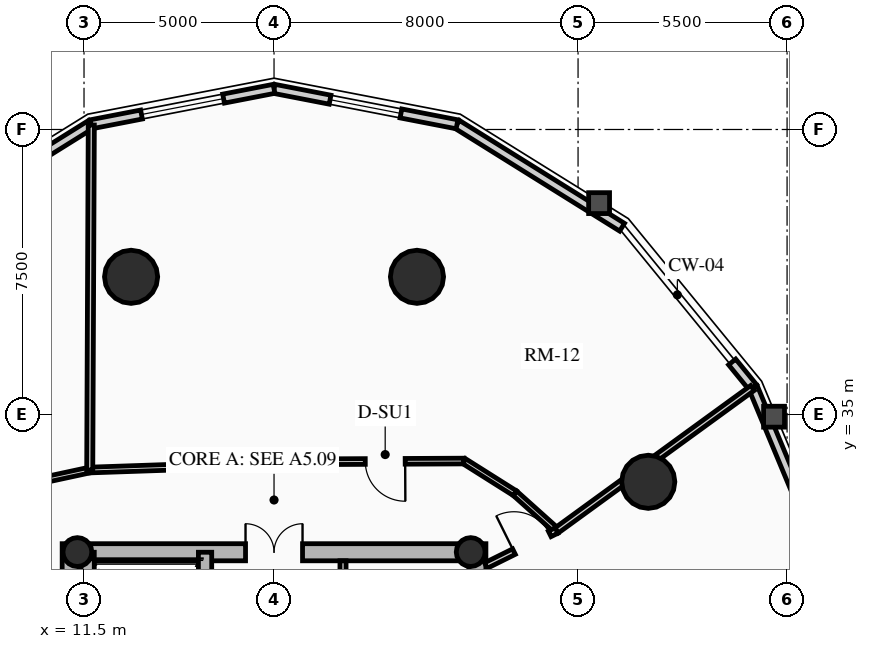
"""IFC4 building model, lengths in metres.
Left out: names, types, materials, properties, quantities, classifications, styles, units other than length and angle.
Written with IfcOpenShell. Run it as: python <this file> out.ifc"""

import sys

from ifc_helpers import new_model, si_unit, direction, frame, frame_2d, origin, origin_2d, place, context, subcontext, project, spatial, rectangle, circle, hollow_circle, extrude, source, transform, mapped, element, fill, save


model = new_model("IFC4")
c1 = context("Model", 3, precision=1e-05, world=origin(), true_north=direction((0.0, 1.0)))
c2 = subcontext(c1, "Body", "Model", "MODEL_VIEW")
j1 = project(units=[si_unit("LENGTHUNIT", "METRE"), si_unit("PLANEANGLEUNIT", "RADIAN")], contexts=[c1])
p1 = place(None, origin())
s1 = spatial("IfcSite", under=j1, at=p1, CompositionType="ELEMENT")
p2 = place(p1, origin())
s2 = spatial("IfcBuilding", under=s1, at=p2, CompositionType="ELEMENT")
p3 = place(p2, frame((0.0, 0.0, 136.6)))
s3 = spatial("IfcBuildingStorey", under=s2, at=p3, CompositionType="ELEMENT", Elevation=136.6)
for number, where, z_axis, x_axis in (
    (1, (11.15, 17.4, 0.0), (0.0, 0.0, 1.0), (0.0, 1.0, 0.0)),
    (2, (21.85, 17.4, 0.0), (0.0, 0.0, 1.0), (0.0, 1.0, 0.0)),
):
    element("IfcWall", number, at=place(p3, frame(where, z_axis=z_axis, x_axis=x_axis)), inside=s3, PredefinedType="SHEAR", context=c2, shape_type="SweptSolid", body=[
        extrude(rectangle(XDim=14.2, YDim=0.45, at=frame_2d((7.1, 0.0))), origin(), (0.0, 0.0, 1.0), 3.72),
    ])
p4 = place(p3, frame((11.15, 31.375, 0.0), z_axis=(0.0, 0.0, 1.0), x_axis=(1.0, 0.0, 0.0)))
e3 = element("IfcWall", 3, at=p4, inside=s3, PredefinedType="SHEAR", context=c2, shape_type="SweptSolid", body=[
    extrude(rectangle(XDim=10.7, YDim=0.45, at=frame_2d((5.35, 0.0))), origin(), (0.0, 0.0, 1.0), 3.72),
])
m1 = source(origin(), c2, "Body", "SweptSolid", [
    extrude(rectangle(XDim=1.5, YDim=2.02, at=frame_2d((0.75, 1.01))), frame((0.0, 0.235, 0.0), z_axis=(0.0, -1.0, 0.0), x_axis=(1.0, 0.0, 0.0)), (0.0, 0.0, 1.0), 0.47),
])
p5 = place(p4, frame((4.6, 0.0, 0.0)))
e4 = element("IfcOpeningElement", 4, at=p5, cuts=e3, PredefinedType="OPENING", context=c2, shape_type="MappedRepresentation", body=[
    mapped(m1, transform((0.0, 0.0, 0.0), x_axis=(1.0, 0.0, 0.0), y_axis=(0.0, 1.0, 0.0), z_axis=(0.0, 0.0, 1.0), scale=1.0)),
])
p6 = place(p3, frame((14.685, 17.625, 0.0), z_axis=(0.0, 0.0, 1.0), x_axis=(0.0, 1.0, 0.0)))
e5 = element("IfcWall", 5, at=p6, inside=s3, PredefinedType="SHEAR", context=c2, shape_type="SweptSolid", body=[
    extrude(rectangle(XDim=13.75, YDim=0.35, at=frame_2d((6.875, 0.0))), origin(), (0.0, 0.0, 1.0), 3.72),
])
m2 = source(origin(), c2, "Body", "SweptSolid", [
    extrude(rectangle(XDim=1.1, YDim=2.015, at=frame_2d((0.55, 1.007))), frame((0.0, 0.185, 0.0), z_axis=(0.0, -1.0, 0.0), x_axis=(1.0, 0.0, 0.0)), (0.0, 0.0, 1.0), 0.37),
])
p7 = place(p6, frame((4.875, 0.0, 0.0)))
e6 = element("IfcOpeningElement", 6, at=p7, cuts=e5, PredefinedType="OPENING", context=c2, shape_type="MappedRepresentation", body=[
    mapped(m2, transform((0.0, 0.0, 0.0), x_axis=(1.0, 0.0, 0.0), y_axis=(0.0, 1.0, 0.0), z_axis=(0.0, 0.0, 1.0), scale=1.0)),
])
p8 = place(p6, frame((0.65, 0.0, 0.0)))
e7 = element("IfcOpeningElement", 7, at=p8, cuts=e5, PredefinedType="OPENING", context=c2, shape_type="MappedRepresentation", body=[
    mapped(m2, transform((0.0, 0.0, 0.0), x_axis=(1.0, 0.0, 0.0), y_axis=(0.0, 1.0, 0.0), z_axis=(0.0, 0.0, 1.0), scale=1.0)),
])
p9 = place(p6, frame((2.65, 0.0, 0.0)))
e8 = element("IfcOpeningElement", 8, at=p9, cuts=e5, PredefinedType="OPENING", context=c2, shape_type="MappedRepresentation", body=[
    mapped(m2, transform((0.0, 0.0, 0.0), x_axis=(1.0, 0.0, 0.0), y_axis=(0.0, 1.0, 0.0), z_axis=(0.0, 0.0, 1.0), scale=1.0)),
])
m3 = source(origin(), c2, "Body", "SweptSolid", [
    extrude(rectangle(XDim=1.15, YDim=2.02, at=frame_2d((0.575, 1.01))), frame((0.0, 0.185, 0.0), z_axis=(0.0, -1.0, 0.0), x_axis=(1.0, 0.0, 0.0)), (0.0, 0.0, 1.0), 0.37),
])
p10 = place(p6, frame((7.295, 0.0, 0.0)))
e9 = element("IfcOpeningElement", 9, at=p10, cuts=e5, PredefinedType="OPENING", context=c2, shape_type="MappedRepresentation", body=[
    mapped(m3, transform((0.0, 0.0, 0.0), x_axis=(1.0, 0.0, 0.0), y_axis=(0.0, 1.0, 0.0), z_axis=(0.0, 0.0, 1.0), scale=1.0)),
])
p11 = place(p3, frame((11.595, 24.655, 0.0), z_axis=(0.0, 0.0, 1.0), x_axis=(0.0, 1.0, 0.0)))
e10 = element("IfcWall", 10, at=p11, inside=s3, PredefinedType="SHEAR", context=c2, shape_type="SweptSolid", body=[
    extrude(rectangle(XDim=6.72, YDim=0.35, at=frame_2d((3.36, 0.0))), origin(), (0.0, 0.0, 1.0), 3.72),
])
for number, where, z_axis, x_axis in (
    (11, (11.325, 31.38, 0.0), (0.0, 0.0, 1.0), (1.0, 0.0, 0.0)),
    (12, (21.675, 31.38, 0.0), (0.0, 0.0, 1.0), (1.0, 0.0, 0.0)),
):
    element("IfcColumn", number, at=place(p3, frame(where, z_axis=z_axis, x_axis=x_axis)), inside=s3, PredefinedType="COLUMN", context=c2, shape_type="SweptSolid", body=[
        extrude(hollow_circle(Radius=0.38, WallThickness=0.032, at=origin_2d()), origin(), (0.0, 0.0, 1.0), 3.72),
    ])
for number, where, z_axis, x_axis in (
    (13, (26.347, 33.229, 0.0), (0.0, 0.0, 1.0), (1.0, 0.0, 0.0)),
    (14, (20.261, 38.623, 0.0), (0.0, 0.0, 1.0), (1.0, 0.0, 0.0)),
    (15, (12.739, 38.623, 0.0), (0.0, 0.0, 1.0), (1.0, 0.0, 0.0)),
):
    element("IfcColumn", number, at=place(p3, frame(where, z_axis=z_axis, x_axis=x_axis)), inside=s3, PredefinedType="USERDEFINED", context=c2, shape_type="SweptSolid", body=[
        extrude(circle(Radius=0.7, at=origin_2d()), origin(), (0.0, 0.0, 1.0), 3.72),
    ])
p12 = place(p3, frame((29.105, 35.709, 0.0), z_axis=(0.0, 0.0, 1.0), x_axis=(0.384344417632, -0.923189779317, 0.0)))
e16 = element("IfcWall", 16, at=p12, inside=s3, PredefinedType="SOLIDWALL", context=c2, shape_type="SweptSolid", body=[
    extrude(rectangle(XDim=5.758, YDim=0.24, at=frame_2d((2.879, 0.0))), origin(), (0.0, 0.0, 1.0), 2.949),
])
p13 = place(p3, frame((28.555, 36.383, 0.0), z_axis=(0.0, 0.0, 1.0), x_axis=(0.632702874536, -0.774394649099, 0.0)))
e17 = element("IfcWall", 17, at=p13, inside=s3, PredefinedType="SOLIDWALL", context=c2, shape_type="SweptSolid", body=[
    extrude(rectangle(XDim=0.87, YDim=0.24, at=frame_2d((0.435, 0.0))), origin(), (0.0, 0.0, 1.0), 2.949),
])
p14 = place(p3, frame((21.315, 42.637, 0.0), z_axis=(0.0, 0.0, 1.0), x_axis=(0.848520380187, -0.529162701263, 0.0)))
e18 = element("IfcWall", 18, at=p14, inside=s3, PredefinedType="SOLIDWALL", context=c2, shape_type="SweptSolid", body=[
    extrude(rectangle(XDim=5.119, YDim=0.24, at=frame_2d((2.56, 0.0))), origin(), (0.0, 0.0, 1.0), 2.949),
])
p15 = place(p3, frame((16.5, 43.57, 0.0), z_axis=(0.0, 0.0, 1.0), x_axis=(0.981723785992, -0.190311344954, 0.0)))
e19 = element("IfcWall", 19, at=p15, inside=s3, PredefinedType="SOLIDWALL", context=c2, shape_type="SweptSolid", body=[
    extrude(rectangle(XDim=4.904, YDim=0.24, at=frame_2d((2.452, 0.0))), origin(), (0.0, 0.0, 1.0), 2.949),
])
m4 = source(origin(), c2, "Body", "SweptSolid", [
    extrude(rectangle(XDim=1.9, YDim=1.35, at=frame_2d((0.95, 0.675))), frame((0.0, 0.13, 0.0), z_axis=(0.0, -1.0, 0.0), x_axis=(1.0, 0.0, 0.0)), (0.0, 0.0, 1.0), 0.26),
])
p16 = place(p15, frame((1.502, 0.0, 0.65)))
e20 = element("IfcOpeningElement", 20, at=p16, cuts=e19, PredefinedType="OPENING", context=c2, shape_type="MappedRepresentation", body=[
    mapped(m4, transform((0.0, 0.0, 0.0), x_axis=(1.0, 0.0, 0.0), y_axis=(0.0, 1.0, 0.0), z_axis=(0.0, 0.0, 1.0), scale=1.0)),
])
p17 = place(p3, frame((11.685, 42.637, 0.0), z_axis=(0.0, 0.0, 1.0), x_axis=(0.981723785992, 0.190311344954, 0.0)))
e21 = element("IfcWall", 21, at=p17, inside=s3, PredefinedType="SOLIDWALL", context=c2, shape_type="SweptSolid", body=[
    extrude(rectangle(XDim=4.904, YDim=0.24, at=frame_2d((2.452, 0.0))), origin(), (0.0, 0.0, 1.0), 2.949),
])
m5 = source(origin(), c2, "Body", "SweptSolid", [
    extrude(rectangle(XDim=2.2, YDim=1.35, at=frame_2d((1.1, 0.675))), frame((0.0, 0.13, 0.0), z_axis=(0.0, -1.0, 0.0), x_axis=(1.0, 0.0, 0.0)), (0.0, 0.0, 1.0), 0.26),
])
p18 = place(p17, frame((1.352, 0.0, 0.65)))
e22 = element("IfcOpeningElement", 22, at=p18, cuts=e21, PredefinedType="OPENING", context=c2, shape_type="MappedRepresentation", body=[
    mapped(m5, transform((0.0, 0.0, 0.0), x_axis=(1.0, 0.0, 0.0), y_axis=(0.0, 1.0, 0.0), z_axis=(0.0, 0.0, 1.0), scale=1.0)),
])
p19 = place(p3, frame((7.342, 39.928, 0.0), z_axis=(0.0, 0.0, 1.0), x_axis=(0.848520380187, 0.529162701263, 0.0)))
e23 = element("IfcWall", 23, at=p19, inside=s3, PredefinedType="SOLIDWALL", context=c2, shape_type="SweptSolid", body=[
    extrude(rectangle(XDim=5.119, YDim=0.24, at=frame_2d((2.56, 0.0))), origin(), (0.0, 0.0, 1.0), 2.949),
])
p20 = place(p3, frame((18.315, 27.25, 0.0), z_axis=(0.0, 0.0, 1.0), x_axis=(0.0, 1.0, 0.0)))
e24 = element("IfcWall", 24, at=p20, inside=s3, PredefinedType="PARTITIONING", context=c2, shape_type="SweptSolid", body=[
    extrude(rectangle(XDim=3.9, YDim=0.16, at=frame_2d((1.95, 0.0))), origin(), (0.0, 0.0, 1.0), 3.425),
])
m6 = source(origin(), c2, "Body", "SweptSolid", [
    extrude(rectangle(XDim=0.9, YDim=2.005, at=frame_2d((0.45, 1.002))), frame((0.0, 0.09, 0.0), z_axis=(0.0, -1.0, 0.0), x_axis=(1.0, 0.0, 0.0)), (0.0, 0.0, 1.0), 0.18),
])
p21 = place(p20, frame((2.2, 0.0, 0.0)))
e25 = element("IfcOpeningElement", 25, at=p21, cuts=e24, PredefinedType="OPENING", context=c2, shape_type="MappedRepresentation", body=[
    mapped(m6, transform((0.0, 0.0, 0.0), x_axis=(1.0, 0.0, 0.0), y_axis=(0.0, 1.0, 0.0), z_axis=(0.0, 0.0, 1.0), scale=1.0)),
])
p22 = place(p3, frame((23.933, 31.946, 0.0), z_axis=(0.0, 0.0, 1.0), x_axis=(-0.744529651383, 0.667589393423, 0.0)))
e26 = element("IfcWall", 26, at=p22, inside=s3, PredefinedType="PARTITIONING", context=c2, shape_type="SweptSolid", body=[
    extrude(rectangle(XDim=1.472, YDim=0.15, at=frame_2d((0.736, 0.0))), origin(), (0.0, 0.0, 1.0), 2.995),
])
p23 = place(p3, frame((22.837, 32.929, 0.0), z_axis=(0.0, 0.0, 1.0), x_axis=(-0.84581079329, 0.533482991252, 0.0)))
e27 = element("IfcWall", 27, at=p23, inside=s3, PredefinedType="PARTITIONING", context=c2, shape_type="SweptSolid", body=[
    extrude(rectangle(XDim=1.585, YDim=0.15, at=frame_2d((0.792, 0.0))), origin(), (0.0, 0.0, 1.0), 2.995),
])
p24 = place(p3, frame((21.496, 33.775, 0.0), z_axis=(0.0, 0.0, 1.0), x_axis=(-0.999989544737, -0.004572790979, 0.0)))
e28 = element("IfcWall", 28, at=p24, inside=s3, PredefinedType="PARTITIONING", context=c2, shape_type="SweptSolid", body=[
    extrude(rectangle(XDim=3.364, YDim=0.15, at=frame_2d((1.682, 0.0))), origin(), (0.0, 0.0, 1.0), 2.995),
])
m7 = source(origin(), c2, "Body", "SweptSolid", [
    extrude(rectangle(XDim=1.05, YDim=2.015, at=frame_2d((0.525, 1.007))), frame((0.0, 0.085, 0.0), z_axis=(0.0, -1.0, 0.0), x_axis=(1.0, 0.0, 0.0)), (0.0, 0.0, 1.0), 0.17),
])
p25 = place(p24, frame((1.546, 0.0, 0.0)))
e29 = element("IfcOpeningElement", 29, at=p25, cuts=e28, PredefinedType="OPENING", context=c2, shape_type="MappedRepresentation", body=[
    mapped(m7, transform((0.0, 0.0, 0.0), x_axis=(1.0, 0.0, 0.0), y_axis=(0.0, 1.0, 0.0), z_axis=(0.0, 0.0, 1.0), scale=1.0)),
])
p26 = place(p3, frame((18.133, 33.76, 0.0), z_axis=(0.0, 0.0, 1.0), x_axis=(-0.999419643988, -0.034064280574, 0.0)))
e30 = element("IfcWall", 30, at=p26, inside=s3, PredefinedType="PARTITIONING", context=c2, shape_type="SweptSolid", body=[
    extrude(rectangle(XDim=6.486, YDim=0.15, at=frame_2d((3.243, 0.0))), origin(), (0.0, 0.0, 1.0), 2.995),
])
p27 = place(p3, frame((11.65, 33.539, 0.0), z_axis=(0.0, 0.0, 1.0), x_axis=(-0.977535921581, -0.210768882949, 0.0)))
e31 = element("IfcWall", 31, at=p27, inside=s3, PredefinedType="PARTITIONING", context=c2, shape_type="SweptSolid", body=[
    extrude(rectangle(XDim=1.923, YDim=0.15, at=frame_2d((0.961, 0.0))), origin(), (0.0, 0.0, 1.0), 2.995),
])
p28 = place(p3, frame((23.933, 31.946, 0.0), z_axis=(0.0, 0.0, 1.0), x_axis=(0.808636722237, 0.588308296261, 0.0)))
e32 = element("IfcWall", 32, at=p28, inside=s3, PredefinedType="PARTITIONING", context=c2, shape_type="SweptSolid", body=[
    extrude(rectangle(XDim=6.376, YDim=0.16, at=frame_2d((3.188, 0.0))), origin(), (0.0, 0.0, 1.0), 2.949),
])
p29 = place(p3, frame((11.65, 33.539, 0.0), z_axis=(0.0, 0.0, 1.0), x_axis=(0.00451754022, 0.999989795863, 0.0)))
e33 = element("IfcWall", 33, at=p29, inside=s3, PredefinedType="PARTITIONING", context=c2, shape_type="SweptSolid", body=[
    extrude(rectangle(XDim=9.079, YDim=0.16, at=frame_2d((4.54, 0.0))), origin(), (0.0, 0.0, 1.0), 2.949),
])
p30 = place(p3, frame((22.075, 31.025, 0.0), z_axis=(0.0, 0.0, 1.0), x_axis=(0.8959286695, 0.444197950432, 0.0)))
e34 = element("IfcWall", 34, at=p30, inside=s3, PredefinedType="PARTITIONING", context=c2, shape_type="SweptSolid", body=[
    extrude(rectangle(XDim=2.074, YDim=0.16, at=frame_2d((1.037, 0.0))), origin(), (0.0, 0.0, 1.0), 2.995),
])
m8 = source(origin(), c2, "Body", "SweptSolid", [
    extrude(rectangle(XDim=1.05, YDim=2.015, at=frame_2d((0.525, 1.007))), frame((0.0, 0.09, 0.0), z_axis=(0.0, -1.0, 0.0), x_axis=(1.0, 0.0, 0.0)), (0.0, 0.0, 1.0), 0.18),
])
p31 = place(p30, frame((0.824, 0.0, 0.0)))
e35 = element("IfcOpeningElement", 35, at=p31, cuts=e34, PredefinedType="OPENING", context=c2, shape_type="MappedRepresentation", body=[
    mapped(m8, transform((0.0, 0.0, 0.0), x_axis=(1.0, 0.0, 0.0), y_axis=(0.0, 1.0, 0.0), z_axis=(0.0, 0.0, 1.0), scale=1.0)),
])
m9 = source(origin(), c2, "Body", "SweptSolid", [
    extrude(rectangle(XDim=1.9, YDim=1.35, at=frame_2d((0.95, 0.675))), frame((0.0, 0.03, 0.0), z_axis=(0.0, -1.0, 0.0), x_axis=(1.0, 0.0, 0.0)), (0.0, 0.0, 1.0), 0.06),
])
p32 = place(p16, origin())
e36 = element("IfcWindow", 36, at=p32, inside=s3, PartitioningType="DOUBLE_PANEL_VERTICAL", PredefinedType="WINDOW", context=c2, shape_type="MappedRepresentation", body=[
    mapped(m9, transform((0.0, 0.0, 0.0), x_axis=(1.0, 0.0, 0.0), y_axis=(0.0, 1.0, 0.0), z_axis=(0.0, 0.0, 1.0), scale=1.0)),
])
fill(e20, e36)
m10 = source(origin(), c2, "Body", "SweptSolid", [
    extrude(rectangle(XDim=2.2, YDim=1.35, at=frame_2d((1.1, 0.675))), frame((0.0, 0.03, 0.0), z_axis=(0.0, -1.0, 0.0), x_axis=(1.0, 0.0, 0.0)), (0.0, 0.0, 1.0), 0.06),
])
p33 = place(p18, origin())
e37 = element("IfcWindow", 37, at=p33, inside=s3, PartitioningType="DOUBLE_PANEL_VERTICAL", PredefinedType="WINDOW", context=c2, shape_type="MappedRepresentation", body=[
    mapped(m10, transform((0.0, 0.0, 0.0), x_axis=(1.0, 0.0, 0.0), y_axis=(0.0, 1.0, 0.0), z_axis=(0.0, 0.0, 1.0), scale=1.0)),
])
fill(e22, e37)
m11 = source(origin(), c2, "Body", "SweptSolid", [
    extrude(rectangle(XDim=1.5, YDim=2.02, at=frame_2d((0.75, 1.01))), frame((0.0, 0.025, 0.0), z_axis=(0.0, -1.0, 0.0), x_axis=(1.0, 0.0, 0.0)), (0.0, 0.0, 1.0), 0.05),
])
p34 = place(p5, origin())
e38 = element("IfcDoor", 38, at=p34, inside=s3, OperationType="DOUBLE_DOOR_SINGLE_SWING", PredefinedType="DOOR", context=c2, shape_type="MappedRepresentation", body=[
    mapped(m11, transform((0.0, 0.0, 0.0), x_axis=(1.0, 0.0, 0.0), y_axis=(0.0, 1.0, 0.0), z_axis=(0.0, 0.0, 1.0), scale=1.0)),
])
fill(e4, e38)
m12 = source(origin(), c2, "Body", "SweptSolid", [
    extrude(rectangle(XDim=1.05, YDim=2.015, at=frame_2d((0.525, 1.007))), frame((0.0, 0.025, 0.0), z_axis=(0.0, -1.0, 0.0), x_axis=(1.0, 0.0, 0.0)), (0.0, 0.0, 1.0), 0.05),
])
p35 = place(p31, origin())
e39 = element("IfcDoor", 39, at=p35, inside=s3, OperationType="SINGLE_SWING_LEFT", PredefinedType="DOOR", context=c2, shape_type="MappedRepresentation", body=[
    mapped(m12, transform((0.0, 0.0, 0.0), x_axis=(1.0, 0.0, 0.0), y_axis=(0.0, 1.0, 0.0), z_axis=(0.0, 0.0, 1.0), scale=1.0)),
])
fill(e35, e39)
p36 = place(p25, origin())
e40 = element("IfcDoor", 40, at=p36, inside=s3, OperationType="SINGLE_SWING_LEFT", PredefinedType="DOOR", context=c2, shape_type="MappedRepresentation", body=[
    mapped(m12, transform((0.0, 0.0, 0.0), x_axis=(1.0, 0.0, 0.0), y_axis=(0.0, 1.0, 0.0), z_axis=(0.0, 0.0, 1.0), scale=1.0)),
])
fill(e29, e40)
save(model, sys.argv[1])
